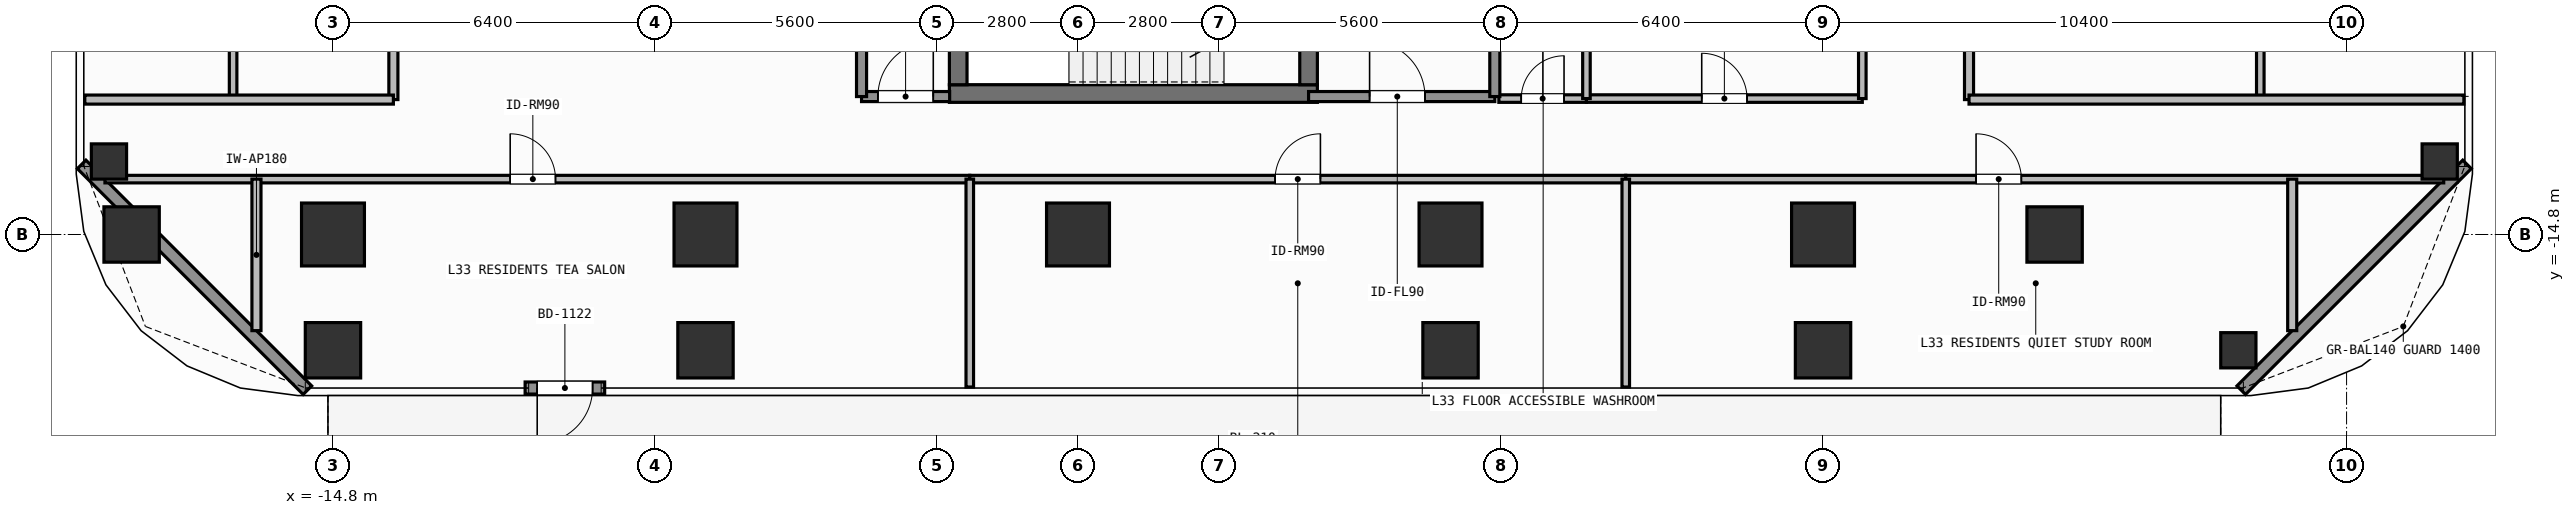
"""IFC4 building model, lengths in metres.
Left out: names, types, materials, properties, quantities, classifications, styles, units other than length and angle.
Written with IfcOpenShell. Run it as: python <this file> out.ifc"""

import sys

from ifc_helpers import new_model, si_unit, direction, frame, frame_2d, origin, origin_2d, place, context, subcontext, project, spatial, rectangle, hollow_rectangle, extrude, element, fill, save


model = new_model("IFC4")
c1 = context("Model", 3, precision=1e-05, world=origin(), true_north=direction((0.0, 1.0)))
c2 = subcontext(c1, "Body", "Model", "MODEL_VIEW")
j1 = project(units=[si_unit("LENGTHUNIT", "METRE"), si_unit("PLANEANGLEUNIT", "RADIAN")], contexts=[c1])
p1 = place(None, origin())
s1 = spatial("IfcSite", under=j1, at=p1, CompositionType="ELEMENT")
p2 = place(p1, origin())
s2 = spatial("IfcBuilding", under=s1, at=p2, CompositionType="ELEMENT")
p3 = place(p2, frame((0.0, 0.0, 132.9)))
s3 = spatial("IfcBuildingStorey", under=s2, at=p3, CompositionType="ELEMENT", Elevation=132.9)
p4 = place(p3, frame((-2.555, -12.0, 0.0), z_axis=(0.0, 0.0, 1.0), x_axis=(1.0, 0.0, 0.0)))
e1 = element("IfcWall", 1, at=p4, inside=s3, PredefinedType="SHEAR", context=c2, shape_type="SweptSolid", body=[
    extrude(rectangle(XDim=7.31, YDim=0.35, at=frame_2d((3.655, 0.0))), origin(), (0.0, 0.0, 1.0), 3.9),
])
p5 = place(p3, frame((-2.38, -11.825, 0.0), z_axis=(0.0, 0.0, 1.0), x_axis=(0.0, 1.0, 0.0)))
e2 = element("IfcWall", 2, at=p5, inside=s3, PredefinedType="SHEAR", context=c2, shape_type="SweptSolid", body=[
    extrude(rectangle(XDim=2.925, YDim=0.35, at=frame_2d((1.462, 0.0))), origin(), (0.0, 0.0, 1.0), 3.9),
])
p6 = place(p3, frame((4.58, -8.9, 0.0), z_axis=(0.0, 0.0, 1.0), x_axis=(0.0, -1.0, 0.0)))
e3 = element("IfcWall", 3, at=p6, inside=s3, PredefinedType="SHEAR", context=c2, shape_type="SweptSolid", body=[
    extrude(rectangle(XDim=2.925, YDim=0.35, at=frame_2d((1.462, 0.0))), origin(), (0.0, 0.0, 1.0), 3.9),
])
p7 = place(p6, frame((0.913, 0.0, 0.0)))
e4 = element("IfcOpeningElement", 4, at=p7, cuts=e3, PredefinedType="OPENING", context=c2, shape_type="SweptSolid", body=[
    extrude(rectangle(XDim=1.1, YDim=2.15, at=frame_2d((0.55, 1.075))), frame((0.0, 0.185, 0.0), z_axis=(0.0, -1.0, 0.0), x_axis=(1.0, 0.0, 0.0)), (0.0, 0.0, 1.0), 0.37),
])
for number, where, z_axis, x_axis in (
    (5, (-14.8, -14.8, 0.0), (0.0, 0.0, 1.0), (1.0, 0.0, 0.0)),
    (6, (-7.4, -14.8, 0.0), (0.0, 0.0, 1.0), (1.0, 0.0, 0.0)),
    (7, (0.0, -14.8, 0.0), (0.0, 0.0, 1.0), (1.0, 0.0, 0.0)),
    (8, (7.4, -14.8, 0.0), (0.0, 0.0, 1.0), (1.0, 0.0, 0.0)),
    (9, (14.8, -14.8, 0.0), (0.0, 0.0, 1.0), (1.0, 0.0, 0.0)),
):
    element("IfcColumn", number, at=place(p3, frame(where, z_axis=z_axis, x_axis=x_axis)), inside=s3, PredefinedType="COLUMN", context=c2, shape_type="SweptSolid", body=[
        extrude(rectangle(XDim=1.25, YDim=1.25, at=origin_2d()), origin(), (0.0, 0.0, 1.0), 3.9),
    ])
for number, where, z_axis, x_axis in (
    (10, (-18.8, -14.8, 0.0), (0.0, 0.0, 1.0), (1.0, 0.0, 0.0)),
    (11, (19.4, -14.8, 0.0), (0.0, 0.0, 1.0), (1.0, 0.0, 0.0)),
    (12, (-14.8, -17.1, 0.0), (0.0, 0.0, 1.0), (1.0, 0.0, 0.0)),
    (13, (-7.4, -17.1, 0.0), (0.0, 0.0, 1.0), (1.0, 0.0, 0.0)),
    (14, (7.4, -17.1, 0.0), (0.0, 0.0, 1.0), (1.0, 0.0, 0.0)),
    (15, (14.8, -17.1, 0.0), (0.0, 0.0, 1.0), (1.0, 0.0, 0.0)),
):
    element("IfcColumn", number, at=place(p3, frame(where, z_axis=z_axis, x_axis=x_axis)), inside=s3, PredefinedType="COLUMN", context=c2, shape_type="SweptSolid", body=[
        extrude(rectangle(XDim=1.1, YDim=1.1, at=origin_2d()), origin(), (0.0, 0.0, 1.0), 3.9),
    ])
for number, where, z_axis, x_axis in (
    (16, (23.05, -17.1, 0.0), (0.0, 0.0, 1.0), (1.0, 0.0, 0.0)),
    (17, (-19.25, -13.35, 0.0), (0.0, 0.0, 1.0), (1.0, 0.0, 0.0)),
    (18, (27.05, -13.35, 0.0), (0.0, 0.0, 1.0), (1.0, 0.0, 0.0)),
):
    element("IfcColumn", number, at=place(p3, frame(where, z_axis=z_axis, x_axis=x_axis)), inside=s3, PredefinedType="COLUMN", context=c2, shape_type="SweptSolid", body=[
        extrude(hollow_rectangle(XDim=0.7, YDim=0.7, WallThickness=0.032, at=origin_2d()), origin(), (0.0, 0.0, 1.0), 3.9),
    ])
p8 = place(p3, frame((-9.403, -17.85, 0.0), z_axis=(0.0, 0.0, 1.0), x_axis=(-1.0, 0.0, 0.0)))
e19 = element("IfcWall", 19, at=p8, inside=s3, PredefinedType="SOLIDWALL", context=c2, shape_type="SweptSolid", body=[
    extrude(rectangle(XDim=1.58, YDim=0.24, at=frame_2d((0.79, 0.0))), origin(), (0.0, 0.0, 1.0), 3.62),
])
p9 = place(p8, frame((0.24, 0.0, 0.0)))
e20 = element("IfcOpeningElement", 20, at=p9, cuts=e19, PredefinedType="OPENING", context=c2, shape_type="SweptSolid", body=[
    extrude(rectangle(XDim=1.1, YDim=2.2, at=frame_2d((0.55, 1.1))), frame((0.0, 0.13, 0.0), z_axis=(0.0, -1.0, 0.0), x_axis=(1.0, 0.0, 0.0)), (0.0, 0.0, 1.0), 0.26),
])
for number, where, z_axis, x_axis in (
    (21, (-15.308, -17.892, 0.0), (0.0, 0.0, 1.0), (-0.707, 0.707, 0.0)),
    (22, (27.592, -13.408, 0.0), (0.0, 0.0, 1.0), (-0.707, -0.707, 0.0)),
):
    element("IfcWall", number, at=place(p3, frame(where, z_axis=z_axis, x_axis=x_axis)), inside=s3, PredefinedType="SOLIDWALL", context=c2, shape_type="SweptSolid", body=[
        extrude(rectangle(XDim=6.342, YDim=0.24, at=frame_2d((3.171, 0.0))), origin(), (0.0, 0.0, 1.0), 3.62),
    ])
p10 = place(p3, frame((4.58, -12.06, 0.0), z_axis=(0.0, 0.0, 1.0), x_axis=(1.0, 0.0, 0.0)))
e23 = element("IfcWall", 23, at=p10, inside=s3, PredefinedType="SOLIDWALL", context=c2, shape_type="SweptSolid", body=[
    extrude(rectangle(XDim=3.7, YDim=0.2, at=frame_2d((1.85, 0.0))), origin(), (0.0, 0.0, 1.0), 3.62),
])
p11 = place(p10, frame((1.212, 0.0, 0.0)))
e24 = element("IfcOpeningElement", 24, at=p11, cuts=e23, PredefinedType="OPENING", context=c2, shape_type="SweptSolid", body=[
    extrude(rectangle(XDim=1.1, YDim=2.15, at=frame_2d((0.55, 1.075))), frame((0.0, 0.11, 0.0), z_axis=(0.0, -1.0, 0.0), x_axis=(1.0, 0.0, 0.0)), (0.0, 0.0, 1.0), 0.22),
])
p12 = place(p3, frame((-4.3, -12.06, 0.0), z_axis=(0.0, 0.0, 1.0), x_axis=(1.0, 0.0, 0.0)))
e25 = element("IfcWall", 25, at=p12, inside=s3, PredefinedType="SOLIDWALL", context=c2, shape_type="SweptSolid", body=[
    extrude(rectangle(XDim=1.75, YDim=0.2, at=frame_2d((0.875, 0.0))), origin(), (0.0, 0.0, 1.0), 3.62),
])
p13 = place(p12, frame((0.325, 0.0, 0.0)))
e26 = element("IfcOpeningElement", 26, at=p13, cuts=e25, PredefinedType="OPENING", context=c2, shape_type="SweptSolid", body=[
    extrude(rectangle(XDim=1.1, YDim=2.15, at=frame_2d((0.55, 1.075))), frame((0.0, 0.11, 0.0), z_axis=(0.0, -1.0, 0.0), x_axis=(1.0, 0.0, 0.0)), (0.0, 0.0, 1.0), 0.22),
])
p14 = place(p3, frame((8.36, -12.1, 0.0), z_axis=(0.0, 0.0, 1.0), x_axis=(1.0, 0.0, 0.0)))
e27 = element("IfcWall", 27, at=p14, inside=s3, PredefinedType="PARTITIONING", context=c2, shape_type="SweptSolid", body=[
    extrude(rectangle(XDim=1.74, YDim=0.15, at=frame_2d((0.87, 0.0))), origin(), (0.0, 0.0, 1.0), 3.62),
])
p15 = place(p14, frame((0.445, 0.0, 0.0)))
e28 = element("IfcOpeningElement", 28, at=p15, cuts=e27, PredefinedType="OPENING", context=c2, shape_type="SweptSolid", body=[
    extrude(rectangle(XDim=0.85, YDim=2.1, at=frame_2d((0.425, 1.05))), frame((0.0, 0.085, 0.0), z_axis=(0.0, -1.0, 0.0), x_axis=(1.0, 0.0, 0.0)), (0.0, 0.0, 1.0), 0.17),
])
p16 = place(p3, frame((10.1, -12.1, 0.0), z_axis=(0.0, 0.0, 1.0), x_axis=(1.0, 0.0, 0.0)))
e29 = element("IfcWall", 29, at=p16, inside=s3, PredefinedType="PARTITIONING", context=c2, shape_type="SweptSolid", body=[
    extrude(rectangle(XDim=5.48, YDim=0.15, at=frame_2d((2.74, 0.0))), origin(), (0.0, 0.0, 1.0), 3.62),
])
p17 = place(p16, frame((2.29, 0.0, 0.0)))
e30 = element("IfcOpeningElement", 30, at=p17, cuts=e29, PredefinedType="OPENING", context=c2, shape_type="SweptSolid", body=[
    extrude(rectangle(XDim=0.9, YDim=2.1, at=frame_2d((0.45, 1.05))), frame((0.0, 0.085, 0.0), z_axis=(0.0, -1.0, 0.0), x_axis=(1.0, 0.0, 0.0)), (0.0, 0.0, 1.0), 0.17),
])
p18 = place(p3, frame((-19.33, -13.7, 0.0), z_axis=(0.0, 0.0, 1.0), x_axis=(1.0, 0.0, 0.0)))
e31 = element("IfcWall", 31, at=p18, inside=s3, PredefinedType="PARTITIONING", context=c2, shape_type="SweptSolid", body=[
    extrude(rectangle(XDim=17.18, YDim=0.15, at=frame_2d((8.59, 0.0))), origin(), (0.0, 0.0, 1.0), 3.62),
])
p19 = place(p18, frame((8.05, 0.0, 0.0)))
e32 = element("IfcOpeningElement", 32, at=p19, cuts=e31, PredefinedType="OPENING", context=c2, shape_type="SweptSolid", body=[
    extrude(rectangle(XDim=0.9, YDim=2.1, at=frame_2d((0.45, 1.05))), frame((0.0, 0.085, 0.0), z_axis=(0.0, -1.0, 0.0), x_axis=(1.0, 0.0, 0.0)), (0.0, 0.0, 1.0), 0.17),
])
p20 = place(p3, frame((-2.15, -13.7, 0.0), z_axis=(0.0, 0.0, 1.0), x_axis=(1.0, 0.0, 0.0)))
e33 = element("IfcWall", 33, at=p20, inside=s3, PredefinedType="PARTITIONING", context=c2, shape_type="SweptSolid", body=[
    extrude(rectangle(XDim=13.031, YDim=0.15, at=frame_2d((6.516, 0.0))), origin(), (0.0, 0.0, 1.0), 3.62),
])
p21 = place(p20, frame((6.065, 0.0, 0.0)))
e34 = element("IfcOpeningElement", 34, at=p21, cuts=e33, PredefinedType="OPENING", context=c2, shape_type="SweptSolid", body=[
    extrude(rectangle(XDim=0.9, YDim=2.1, at=frame_2d((0.45, 1.05))), frame((0.0, 0.085, 0.0), z_axis=(0.0, -1.0, 0.0), x_axis=(1.0, 0.0, 0.0)), (0.0, 0.0, 1.0), 0.17),
])
p22 = place(p3, frame((10.881, -13.7, 0.0), z_axis=(0.0, 0.0, 1.0), x_axis=(1.0, 0.0, 0.0)))
e35 = element("IfcWall", 35, at=p22, inside=s3, PredefinedType="PARTITIONING", context=c2, shape_type="SweptSolid", body=[
    extrude(rectangle(XDim=16.249, YDim=0.15, at=frame_2d((8.125, 0.0))), origin(), (0.0, 0.0, 1.0), 3.62),
])
p23 = place(p22, frame((6.959, 0.0, 0.0)))
e36 = element("IfcOpeningElement", 36, at=p23, cuts=e35, PredefinedType="OPENING", context=c2, shape_type="SweptSolid", body=[
    extrude(rectangle(XDim=0.9, YDim=2.1, at=frame_2d((0.45, 1.05))), frame((0.0, 0.085, 0.0), z_axis=(0.0, -1.0, 0.0), x_axis=(1.0, 0.0, 0.0)), (0.0, 0.0, 1.0), 0.17),
])
p24 = place(p3, frame((-13.6, -12.12, 0.0), z_axis=(0.0, 0.0, 1.0), x_axis=(0.0, 1.0, 0.0)))
e37 = element("IfcWall", 37, at=p24, inside=s3, PredefinedType="PARTITIONING", context=c2, shape_type="SweptSolid", body=[
    extrude(rectangle(XDim=24.24, YDim=0.18, at=frame_2d((12.12, 0.0))), origin(), (0.0, 0.0, 1.0), 3.62),
])
p25 = place(p24, frame((11.62, 0.0, 0.0)))
e38 = element("IfcOpeningElement", 38, at=p25, cuts=e37, PredefinedType="OPENING", context=c2, shape_type="SweptSolid", body=[
    extrude(rectangle(XDim=1.0, YDim=2.2, at=frame_2d((0.5, 1.1))), frame((0.0, 0.1, 0.0), z_axis=(0.0, -1.0, 0.0), x_axis=(1.0, 0.0, 0.0)), (0.0, 0.0, 1.0), 0.2),
])
p26 = place(p3, frame((17.7, -12.12, 0.0), z_axis=(0.0, 0.0, 1.0), x_axis=(0.0, 1.0, 0.0)))
e39 = element("IfcWall", 39, at=p26, inside=s3, PredefinedType="PARTITIONING", context=c2, shape_type="SweptSolid", body=[
    extrude(rectangle(XDim=13.429, YDim=0.18, at=frame_2d((6.715, 0.0))), origin(), (0.0, 0.0, 1.0), 3.62),
])
p27 = place(p26, frame((5.324, 0.0, 0.0)))
e40 = element("IfcOpeningElement", 40, at=p27, cuts=e39, PredefinedType="OPENING", context=c2, shape_type="SweptSolid", body=[
    extrude(rectangle(XDim=1.0, YDim=2.2, at=frame_2d((0.5, 1.1))), frame((0.0, 0.1, 0.0), z_axis=(0.0, -1.0, 0.0), x_axis=(1.0, 0.0, 0.0)), (0.0, 0.0, 1.0), 0.2),
])
for number, where, z_axis, x_axis in (
    (41, (8.28, -12.06, 0.0), (0.0, 0.0, 1.0), (0.0, 1.0, 0.0)),
    (42, (-4.3, -12.06, 0.0), (0.0, 0.0, 1.0), (0.0, 1.0, 0.0)),
):
    element("IfcWall", number, at=place(p3, frame(where, z_axis=z_axis, x_axis=x_axis)), inside=s3, PredefinedType="SOLIDWALL", context=c2, shape_type="SweptSolid", body=[
        extrude(rectangle(XDim=3.185, YDim=0.2, at=frame_2d((1.593, 0.0))), origin(), (0.0, 0.0, 1.0), 3.62),
    ])
p28 = place(p3, frame((10.1, -12.1, 0.0), z_axis=(0.0, 0.0, 1.0), x_axis=(0.0, 1.0, 0.0)))
e43 = element("IfcWall", 43, at=p28, inside=s3, PredefinedType="PARTITIONING", context=c2, shape_type="SweptSolid", body=[
    extrude(rectangle(XDim=2.35, YDim=0.15, at=frame_2d((1.175, 0.0))), origin(), (0.0, 0.0, 1.0), 3.62),
])
p29 = place(p3, frame((15.58, -12.1, 0.0), z_axis=(0.0, 0.0, 1.0), x_axis=(0.0, 1.0, 0.0)))
e44 = element("IfcWall", 44, at=p29, inside=s3, PredefinedType="PARTITIONING", context=c2, shape_type="SweptSolid", body=[
    extrude(rectangle(XDim=6.25, YDim=0.15, at=frame_2d((3.125, 0.0))), origin(), (0.0, 0.0, 1.0), 3.62),
])
for number, where, z_axis, x_axis in (
    (45, (-16.32, -16.71, 0.0), (0.0, 0.0, 1.0), (0.0, 1.0, 0.0)),
    (46, (24.12, -16.71, 0.0), (0.0, 0.0, 1.0), (0.0, 1.0, 0.0)),
):
    element("IfcWall", number, at=place(p3, frame(where, z_axis=z_axis, x_axis=x_axis)), inside=s3, PredefinedType="PARTITIONING", context=c2, shape_type="SweptSolid", body=[
        extrude(rectangle(XDim=3.01, YDim=0.18, at=frame_2d((1.505, 0.0))), origin(), (0.0, 0.0, 1.0), 3.62),
    ])
p30 = place(p3, frame((-2.15, -17.83, 0.0), z_axis=(0.0, 0.0, 1.0), x_axis=(0.0, 1.0, 0.0)))
e47 = element("IfcWall", 47, at=p30, inside=s3, PredefinedType="PARTITIONING", context=c2, shape_type="SweptSolid", body=[
    extrude(rectangle(XDim=4.13, YDim=0.15, at=frame_2d((2.065, 0.0))), origin(), (0.0, 0.0, 1.0), 3.62),
])
p31 = place(p3, frame((10.881, -17.83, 0.0), z_axis=(0.0, 0.0, 1.0), x_axis=(0.0, 1.0, 0.0)))
e48 = element("IfcWall", 48, at=p31, inside=s3, PredefinedType="PARTITIONING", context=c2, shape_type="SweptSolid", body=[
    extrude(rectangle(XDim=4.13, YDim=0.15, at=frame_2d((2.065, 0.0))), origin(), (0.0, 0.0, 1.0), 3.31),
])
p32 = place(p3, frame((-16.784, -12.12, 0.0), z_axis=(0.0, 0.0, 1.0), x_axis=(0.0, 1.0, 0.0)))
e49 = element("IfcWall", 49, at=p32, inside=s3, PredefinedType="PARTITIONING", context=c2, shape_type="SweptSolid", body=[
    extrude(rectangle(XDim=6.671, YDim=0.15, at=frame_2d((3.335, 0.0))), origin(), (0.0, 0.0, 1.0), 3.62),
])
p33 = place(p3, frame((-19.73, -12.12, 0.0), z_axis=(0.0, 0.0, 1.0), x_axis=(1.0, 0.0, 0.0)))
e50 = element("IfcWall", 50, at=p33, inside=s3, PredefinedType="PARTITIONING", context=c2, shape_type="SweptSolid", body=[
    extrude(rectangle(XDim=6.13, YDim=0.18, at=frame_2d((3.065, 0.0))), origin(), (0.0, 0.0, 1.0), 3.62),
])
p34 = place(p3, frame((23.486, -12.12, 0.0), z_axis=(0.0, 0.0, 1.0), x_axis=(0.0, 1.0, 0.0)))
e51 = element("IfcWall", 51, at=p34, inside=s3, PredefinedType="PARTITIONING", context=c2, shape_type="SweptSolid", body=[
    extrude(rectangle(XDim=2.8, YDim=0.15, at=frame_2d((1.4, 0.0))), origin(), (0.0, 0.0, 1.0), 3.62),
])
p35 = place(p3, frame((17.7, -12.12, 0.0), z_axis=(0.0, 0.0, 1.0), x_axis=(1.0, 0.0, 0.0)))
e52 = element("IfcWall", 52, at=p35, inside=s3, PredefinedType="PARTITIONING", context=c2, shape_type="SweptSolid", body=[
    extrude(rectangle(XDim=9.83, YDim=0.18, at=frame_2d((4.915, 0.0))), origin(), (0.0, 0.0, 1.0), 3.62),
])
p36 = place(p9, origin())
e53 = element("IfcDoor", 53, at=p36, inside=s3, OperationType="SINGLE_SWING_RIGHT", PredefinedType="DOOR", context=c2, shape_type="SweptSolid", body=[
    extrude(rectangle(XDim=1.1, YDim=2.2, at=frame_2d((0.55, 1.1))), frame((0.0, 0.025, 0.0), z_axis=(0.0, -1.0, 0.0), x_axis=(1.0, 0.0, 0.0)), (0.0, 0.0, 1.0), 0.05),
])
fill(e20, e53)
p37 = place(p11, origin())
e54 = element("IfcDoor", 54, at=p37, inside=s3, OperationType="SINGLE_SWING_LEFT", PredefinedType="DOOR", context=c2, shape_type="SweptSolid", body=[
    extrude(rectangle(XDim=1.1, YDim=2.15, at=frame_2d((0.55, 1.075))), frame((0.0, 0.025, 0.0), z_axis=(0.0, -1.0, 0.0), x_axis=(1.0, 0.0, 0.0)), (0.0, 0.0, 1.0), 0.05),
])
fill(e24, e54)
p38 = place(p13, origin())
e55 = element("IfcDoor", 55, at=p38, inside=s3, OperationType="SINGLE_SWING_RIGHT", PredefinedType="DOOR", context=c2, shape_type="SweptSolid", body=[
    extrude(rectangle(XDim=1.1, YDim=2.15, at=frame_2d((0.55, 1.075))), frame((0.0, 0.025, 0.0), z_axis=(0.0, -1.0, 0.0), x_axis=(1.0, 0.0, 0.0)), (0.0, 0.0, 1.0), 0.05),
])
fill(e26, e55)
p39 = place(p15, origin())
e56 = element("IfcDoor", 56, at=p39, inside=s3, OperationType="SINGLE_SWING_RIGHT", PredefinedType="DOOR", context=c2, shape_type="SweptSolid", body=[
    extrude(rectangle(XDim=0.85, YDim=2.1, at=frame_2d((0.425, 1.05))), frame((0.0, 0.025, 0.0), z_axis=(0.0, -1.0, 0.0), x_axis=(1.0, 0.0, 0.0)), (0.0, 0.0, 1.0), 0.05),
])
fill(e28, e56)
p40 = place(p17, origin())
e57 = element("IfcDoor", 57, at=p40, inside=s3, OperationType="SINGLE_SWING_LEFT", PredefinedType="DOOR", context=c2, shape_type="SweptSolid", body=[
    extrude(rectangle(XDim=0.9, YDim=2.1, at=frame_2d((0.45, 1.05))), frame((0.0, 0.025, 0.0), z_axis=(0.0, -1.0, 0.0), x_axis=(1.0, 0.0, 0.0)), (0.0, 0.0, 1.0), 0.05),
])
fill(e30, e57)
p41 = place(p19, origin())
e58 = element("IfcDoor", 58, at=p41, inside=s3, OperationType="SINGLE_SWING_LEFT", PredefinedType="DOOR", context=c2, shape_type="SweptSolid", body=[
    extrude(rectangle(XDim=0.9, YDim=2.1, at=frame_2d((0.45, 1.05))), frame((0.0, 0.025, 0.0), z_axis=(0.0, -1.0, 0.0), x_axis=(1.0, 0.0, 0.0)), (0.0, 0.0, 1.0), 0.05),
])
fill(e32, e58)
p42 = place(p21, origin())
e59 = element("IfcDoor", 59, at=p42, inside=s3, OperationType="SINGLE_SWING_RIGHT", PredefinedType="DOOR", context=c2, shape_type="SweptSolid", body=[
    extrude(rectangle(XDim=0.9, YDim=2.1, at=frame_2d((0.45, 1.05))), frame((0.0, 0.025, 0.0), z_axis=(0.0, -1.0, 0.0), x_axis=(1.0, 0.0, 0.0)), (0.0, 0.0, 1.0), 0.05),
])
fill(e34, e59)
p43 = place(p23, origin())
e60 = element("IfcDoor", 60, at=p43, inside=s3, OperationType="SINGLE_SWING_LEFT", PredefinedType="DOOR", context=c2, shape_type="SweptSolid", body=[
    extrude(rectangle(XDim=0.9, YDim=2.1, at=frame_2d((0.45, 1.05))), frame((0.0, 0.025, 0.0), z_axis=(0.0, -1.0, 0.0), x_axis=(1.0, 0.0, 0.0)), (0.0, 0.0, 1.0), 0.05),
])
fill(e36, e60)
save(model, sys.argv[1])
